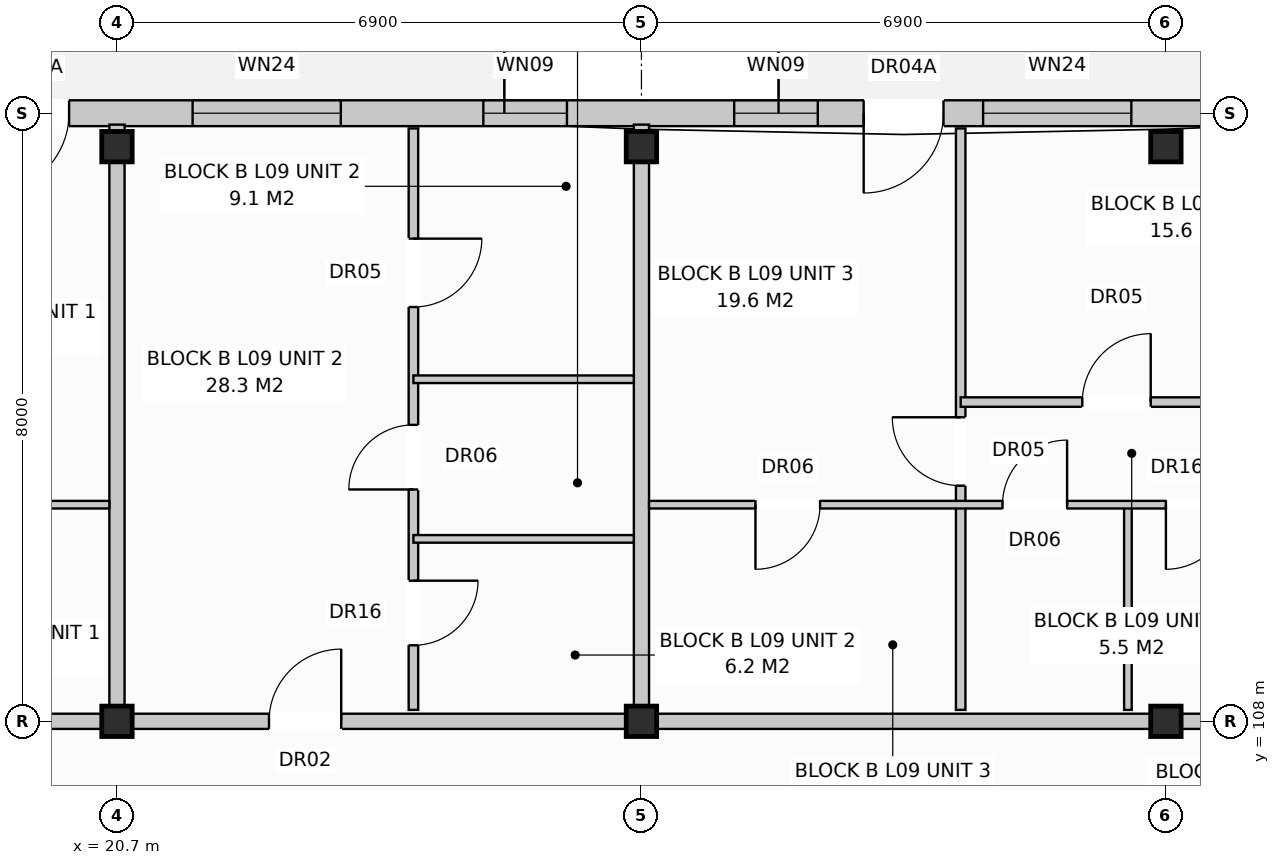
"""IFC4 building model, lengths in metres.
Left out: names, types, materials, properties, quantities, classifications, styles, units other than length and angle.
Written with IfcOpenShell. Run it as: python <this file> out.ifc"""

import sys

from ifc_helpers import new_model, si_unit, direction, frame, frame_2d, origin, origin_with_axes, origin_2d, place, context, subcontext, project, spatial, rectangle, extrude, element, fill, save


model = new_model("IFC4")
c1 = context("Model", 3, precision=1e-05, world=origin(), true_north=direction((0.0, 1.0)))
c2 = subcontext(c1, "Body", "Model", "MODEL_VIEW")
j1 = project(units=[si_unit("LENGTHUNIT", "METRE"), si_unit("PLANEANGLEUNIT", "RADIAN")], contexts=[c1])
p1 = place(None, origin())
s1 = spatial("IfcSite", under=j1, at=p1, CompositionType="ELEMENT")
p2 = place(p1, origin())
s2 = spatial("IfcBuilding", under=s1, at=p2, CompositionType="ELEMENT")
p3 = place(p2, frame((0.0, 0.0, 30.4)))
s3 = spatial("IfcBuildingStorey", under=s2, at=p3, CompositionType="ELEMENT", Elevation=30.4)
for number, where, z_axis, x_axis in (
    (1, (20.7, 108.0, 0.0), (0.0, 0.0, 1.0), (1.0, 0.0, 0.0)),
    (2, (20.7, 115.56, 0.0), (0.0, 0.0, 1.0), (1.0, 0.0, 0.0)),
    (3, (27.6, 108.0, 0.0), (0.0, 0.0, 1.0), (1.0, 0.0, 0.0)),
    (4, (27.6, 115.56, 0.0), (0.0, 0.0, 1.0), (1.0, 0.0, 0.0)),
    (5, (34.5, 108.0, 0.0), (0.0, 0.0, 1.0), (1.0, 0.0, 0.0)),
    (6, (34.5, 115.56, 0.0), (0.0, 0.0, 1.0), (1.0, 0.0, 0.0)),
):
    element("IfcColumn", number, at=place(p3, frame(where, z_axis=z_axis, x_axis=x_axis)), inside=s3, PredefinedType="COLUMN", context=c2, shape_type="SweptSolid", body=[
        extrude(rectangle(XDim=0.4, YDim=0.4, at=origin_2d()), origin(), (0.0, 0.0, 1.0), 3.2),
    ])
p4 = place(p3, frame((0.16, 116.0, 0.0), z_axis=(0.0, 0.0, 1.0), x_axis=(1.0, 0.0, 0.0)))
e7 = element("IfcWall", 7, at=p4, inside=s3, PredefinedType="STANDARD", context=c2, shape_type="SweptSolid", body=[
    extrude(rectangle(XDim=41.08, YDim=0.34, at=frame_2d((20.54, 0.0))), origin(), (0.0, 0.0, 1.0), 2.96),
])
p5 = place(p4, frame((4.864, 0.0, 0.0)))
e8 = element("IfcOpeningElement", 8, at=p5, cuts=e7, PredefinedType="OPENING", context=c2, shape_type="SweptSolid", body=[
    extrude(rectangle(XDim=1.05, YDim=2.12, at=frame_2d((0.525, 1.06))), frame((0.0, 0.182, 0.0), z_axis=(0.0, -1.0, 0.0), x_axis=(1.0, 0.0, 0.0)), (0.0, 0.0, 1.0), 0.364),
])
p6 = place(p4, frame((18.86, 0.0, 0.0)))
e9 = element("IfcOpeningElement", 9, at=p6, cuts=e7, PredefinedType="OPENING", context=c2, shape_type="SweptSolid", body=[
    extrude(rectangle(XDim=1.05, YDim=2.12, at=frame_2d((0.525, 1.06))), frame((0.0, 0.182, 0.0), z_axis=(0.0, -1.0, 0.0), x_axis=(1.0, 0.0, 0.0)), (0.0, 0.0, 1.0), 0.364),
])
p7 = place(p4, frame((30.364, 0.0, 0.0)))
e10 = element("IfcOpeningElement", 10, at=p7, cuts=e7, PredefinedType="OPENING", context=c2, shape_type="SweptSolid", body=[
    extrude(rectangle(XDim=1.05, YDim=2.12, at=frame_2d((0.525, 1.06))), frame((0.0, 0.182, 0.0), z_axis=(0.0, -1.0, 0.0), x_axis=(1.0, 0.0, 0.0)), (0.0, 0.0, 1.0), 0.364),
])
p8 = place(p4, frame((2.46, 0.0, 0.72)))
e11 = element("IfcOpeningElement", 11, at=p8, cuts=e7, PredefinedType="OPENING", context=c2, shape_type="SweptSolid", body=[
    extrude(rectangle(XDim=1.1, YDim=1.5, at=frame_2d((0.55, 0.75))), frame((0.0, 0.182, 0.0), z_axis=(0.0, -1.0, 0.0), x_axis=(1.0, 0.0, 0.0)), (0.0, 0.0, 1.0), 0.364),
])
p9 = place(p4, frame((7.735, 0.0, 0.8)))
e12 = element("IfcOpeningElement", 12, at=p9, cuts=e7, PredefinedType="OPENING", context=c2, shape_type="SweptSolid", body=[
    extrude(rectangle(XDim=1.95, YDim=1.65, at=frame_2d((0.975, 0.825))), frame((0.0, 0.182, 0.0), z_axis=(0.0, -1.0, 0.0), x_axis=(1.0, 0.0, 0.0)), (0.0, 0.0, 1.0), 0.364),
])
p10 = place(p4, frame((14.56, 0.0, 0.72)))
e13 = element("IfcOpeningElement", 13, at=p10, cuts=e7, PredefinedType="OPENING", context=c2, shape_type="SweptSolid", body=[
    extrude(rectangle(XDim=1.1, YDim=1.5, at=frame_2d((0.55, 0.75))), frame((0.0, 0.182, 0.0), z_axis=(0.0, -1.0, 0.0), x_axis=(1.0, 0.0, 0.0)), (0.0, 0.0, 1.0), 0.364),
])
p11 = place(p4, frame((16.81, 0.0, 0.8)))
e14 = element("IfcOpeningElement", 14, at=p11, cuts=e7, PredefinedType="OPENING", context=c2, shape_type="SweptSolid", body=[
    extrude(rectangle(XDim=1.8, YDim=1.7, at=frame_2d((0.9, 0.85))), frame((0.0, 0.182, 0.0), z_axis=(0.0, -1.0, 0.0), x_axis=(1.0, 0.0, 0.0)), (0.0, 0.0, 1.0), 0.364),
])
p12 = place(p4, frame((21.535, 0.0, 0.8)))
e15 = element("IfcOpeningElement", 15, at=p12, cuts=e7, PredefinedType="OPENING", context=c2, shape_type="SweptSolid", body=[
    extrude(rectangle(XDim=1.95, YDim=1.65, at=frame_2d((0.975, 0.825))), frame((0.0, 0.182, 0.0), z_axis=(0.0, -1.0, 0.0), x_axis=(1.0, 0.0, 0.0)), (0.0, 0.0, 1.0), 0.364),
])
p13 = place(p4, frame((25.36, 0.0, 0.72)))
e16 = element("IfcOpeningElement", 16, at=p13, cuts=e7, PredefinedType="OPENING", context=c2, shape_type="SweptSolid", body=[
    extrude(rectangle(XDim=1.1, YDim=1.5, at=frame_2d((0.55, 0.75))), frame((0.0, 0.182, 0.0), z_axis=(0.0, -1.0, 0.0), x_axis=(1.0, 0.0, 0.0)), (0.0, 0.0, 1.0), 0.364),
])
p14 = place(p4, frame((28.66, 0.0, 0.72)))
e17 = element("IfcOpeningElement", 17, at=p14, cuts=e7, PredefinedType="OPENING", context=c2, shape_type="SweptSolid", body=[
    extrude(rectangle(XDim=1.1, YDim=1.5, at=frame_2d((0.55, 0.75))), frame((0.0, 0.182, 0.0), z_axis=(0.0, -1.0, 0.0), x_axis=(1.0, 0.0, 0.0)), (0.0, 0.0, 1.0), 0.364),
])
p15 = place(p4, frame((31.935, 0.0, 0.8)))
e18 = element("IfcOpeningElement", 18, at=p15, cuts=e7, PredefinedType="OPENING", context=c2, shape_type="SweptSolid", body=[
    extrude(rectangle(XDim=1.95, YDim=1.65, at=frame_2d((0.975, 0.825))), frame((0.0, 0.182, 0.0), z_axis=(0.0, -1.0, 0.0), x_axis=(1.0, 0.0, 0.0)), (0.0, 0.0, 1.0), 0.364),
])
p16 = place(p4, frame((38.06, 0.0, 0.72)))
e19 = element("IfcOpeningElement", 19, at=p16, cuts=e7, PredefinedType="OPENING", context=c2, shape_type="SweptSolid", body=[
    extrude(rectangle(XDim=1.1, YDim=1.5, at=frame_2d((0.55, 0.75))), frame((0.0, 0.182, 0.0), z_axis=(0.0, -1.0, 0.0), x_axis=(1.0, 0.0, 0.0)), (0.0, 0.0, 1.0), 0.364),
])
p17 = place(p3, frame((20.7, 108.15, 0.0), z_axis=(0.0, 0.0, 1.0), x_axis=(0.0, 1.0, 0.0)))
e20 = element("IfcWall", 20, at=p17, inside=s3, PredefinedType="PARTITIONING", context=c2, shape_type="SweptSolid", body=[
    extrude(rectangle(XDim=7.7, YDim=0.2, at=frame_2d((3.85, 0.0))), origin(), (0.0, 0.0, 1.0), 2.96),
])
p18 = place(p3, frame((0.0, 108.0, 0.0), z_axis=(0.0, 0.0, 1.0), x_axis=(1.0, 0.0, 0.0)))
e21 = element("IfcWall", 21, at=p18, inside=s3, PredefinedType="PARTITIONING", context=c2, shape_type="SweptSolid", body=[
    extrude(rectangle(XDim=20.7, YDim=0.2, at=frame_2d((10.35, 0.0))), origin(), (0.0, 0.0, 1.0), 2.4),
])
p19 = place(p18, frame((2.4, 0.0, 0.0)))
e22 = element("IfcOpeningElement", 22, at=p19, cuts=e21, PredefinedType="OPENING", context=c2, shape_type="SweptSolid", body=[
    extrude(rectangle(XDim=0.95, YDim=2.15, at=frame_2d((0.475, 1.075))), frame((0.0, 0.112, 0.0), z_axis=(0.0, -1.0, 0.0), x_axis=(1.0, 0.0, 0.0)), (0.0, 0.0, 1.0), 0.224),
])
p20 = place(p3, frame((6.3, 110.85, 0.0), z_axis=(0.0, 0.0, 1.0), x_axis=(1.0, 0.0, 0.0)))
e23 = element("IfcWall", 23, at=p20, inside=s3, PredefinedType="PARTITIONING", context=c2, shape_type="SweptSolid", body=[
    extrude(rectangle(XDim=14.3, YDim=0.1, at=frame_2d((7.15, 0.0))), origin(), (0.0, 0.0, 1.0), 2.96),
])
p21 = place(p20, frame((1.6, 0.0, 0.0)))
e24 = element("IfcOpeningElement", 24, at=p21, cuts=e23, PredefinedType="OPENING", context=c2, shape_type="SweptSolid", body=[
    extrude(rectangle(XDim=0.9, YDim=2.1, at=frame_2d((0.45, 1.05))), frame((0.0, 0.062, 0.0), z_axis=(0.0, -1.0, 0.0), x_axis=(1.0, 0.0, 0.0)), (0.0, 0.0, 1.0), 0.124),
])
p22 = place(p20, frame((5.1, 0.0, 0.0)))
e25 = element("IfcOpeningElement", 25, at=p22, cuts=e23, PredefinedType="OPENING", context=c2, shape_type="SweptSolid", body=[
    extrude(rectangle(XDim=0.85, YDim=2.05, at=frame_2d((0.425, 1.025))), frame((0.0, 0.062, 0.0), z_axis=(0.0, -1.0, 0.0), x_axis=(1.0, 0.0, 0.0)), (0.0, 0.0, 1.0), 0.124),
])
p23 = place(p20, frame((8.2, 0.0, 0.0)))
e26 = element("IfcOpeningElement", 26, at=p23, cuts=e23, PredefinedType="OPENING", context=c2, shape_type="SweptSolid", body=[
    extrude(rectangle(XDim=0.85, YDim=2.05, at=frame_2d((0.425, 1.025))), frame((0.0, 0.062, 0.0), z_axis=(0.0, -1.0, 0.0), x_axis=(1.0, 0.0, 0.0)), (0.0, 0.0, 1.0), 0.124),
])
p24 = place(p20, frame((11.6, 0.0, 0.0)))
e27 = element("IfcOpeningElement", 27, at=p24, cuts=e23, PredefinedType="OPENING", context=c2, shape_type="SweptSolid", body=[
    extrude(rectangle(XDim=0.85, YDim=2.05, at=frame_2d((0.425, 1.025))), frame((0.0, 0.062, 0.0), z_axis=(0.0, -1.0, 0.0), x_axis=(1.0, 0.0, 0.0)), (0.0, 0.0, 1.0), 0.124),
])
p25 = place(p3, frame((27.6, 108.15, 0.0), z_axis=(0.0, 0.0, 1.0), x_axis=(0.0, 1.0, 0.0)))
e28 = element("IfcWall", 28, at=p25, inside=s3, PredefinedType="PARTITIONING", context=c2, shape_type="SweptSolid", body=[
    extrude(rectangle(XDim=7.7, YDim=0.2, at=frame_2d((3.85, 0.0))), origin(), (0.0, 0.0, 1.0), 2.96),
])
p26 = place(p3, frame((20.7, 108.0, 0.0), z_axis=(0.0, 0.0, 1.0), x_axis=(1.0, 0.0, 0.0)))
e29 = element("IfcWall", 29, at=p26, inside=s3, PredefinedType="PARTITIONING", context=c2, shape_type="SweptSolid", body=[
    extrude(rectangle(XDim=6.9, YDim=0.2, at=frame_2d((3.45, 0.0))), origin(), (0.0, 0.0, 1.0), 2.4),
])
p27 = place(p26, frame((2.0, 0.0, 0.0)))
e30 = element("IfcOpeningElement", 30, at=p27, cuts=e29, PredefinedType="OPENING", context=c2, shape_type="SweptSolid", body=[
    extrude(rectangle(XDim=0.95, YDim=2.15, at=frame_2d((0.475, 1.075))), frame((0.0, 0.112, 0.0), z_axis=(0.0, -1.0, 0.0), x_axis=(1.0, 0.0, 0.0)), (0.0, 0.0, 1.0), 0.224),
])
p28 = place(p3, frame((24.6, 108.15, 0.0), z_axis=(0.0, 0.0, 1.0), x_axis=(0.0, 1.0, 0.0)))
e31 = element("IfcWall", 31, at=p28, inside=s3, PredefinedType="PARTITIONING", context=c2, shape_type="SweptSolid", body=[
    extrude(rectangle(XDim=7.65, YDim=0.125, at=frame_2d((3.825, 0.0))), origin(), (0.0, 0.0, 1.0), 2.96),
])
p29 = place(p28, frame((0.85, 0.0, 0.0)))
e32 = element("IfcOpeningElement", 32, at=p29, cuts=e31, PredefinedType="OPENING", context=c2, shape_type="SweptSolid", body=[
    extrude(rectangle(XDim=0.85, YDim=2.1, at=frame_2d((0.425, 1.05))), frame((0.0, 0.074, 0.0), z_axis=(0.0, -1.0, 0.0), x_axis=(1.0, 0.0, 0.0)), (0.0, 0.0, 1.0), 0.149),
])
p30 = place(p28, frame((2.9, 0.0, 0.0)))
e33 = element("IfcOpeningElement", 33, at=p30, cuts=e31, PredefinedType="OPENING", context=c2, shape_type="SweptSolid", body=[
    extrude(rectangle(XDim=0.85, YDim=2.05, at=frame_2d((0.425, 1.025))), frame((0.0, 0.074, 0.0), z_axis=(0.0, -1.0, 0.0), x_axis=(1.0, 0.0, 0.0)), (0.0, 0.0, 1.0), 0.149),
])
p31 = place(p28, frame((5.3, 0.0, 0.0)))
e34 = element("IfcOpeningElement", 34, at=p31, cuts=e31, PredefinedType="OPENING", context=c2, shape_type="SweptSolid", body=[
    extrude(rectangle(XDim=0.9, YDim=2.1, at=frame_2d((0.45, 1.05))), frame((0.0, 0.074, 0.0), z_axis=(0.0, -1.0, 0.0), x_axis=(1.0, 0.0, 0.0)), (0.0, 0.0, 1.0), 0.149),
])
for number, where, z_axis, x_axis in (
    (35, (24.6, 110.4, 0.0), (0.0, 0.0, 1.0), (1.0, 0.0, 0.0)),
    (36, (24.6, 112.5, 0.0), (0.0, 0.0, 1.0), (1.0, 0.0, 0.0)),
):
    element("IfcWall", number, at=place(p3, frame(where, z_axis=z_axis, x_axis=x_axis)), inside=s3, PredefinedType="PARTITIONING", context=c2, shape_type="SweptSolid", body=[
        extrude(rectangle(XDim=2.9, YDim=0.1, at=frame_2d((1.45, 0.0))), origin(), (0.0, 0.0, 1.0), 2.96),
    ])
p32 = place(p3, frame((27.6, 108.0, 0.0), z_axis=(0.0, 0.0, 1.0), x_axis=(1.0, 0.0, 0.0)))
e37 = element("IfcWall", 37, at=p32, inside=s3, PredefinedType="PARTITIONING", context=c2, shape_type="SweptSolid", body=[
    extrude(rectangle(XDim=13.8, YDim=0.2, at=frame_2d((6.9, 0.0))), origin(), (0.0, 0.0, 1.0), 2.4),
])
p33 = place(p32, frame((9.6, 0.0, 0.0)))
e38 = element("IfcOpeningElement", 38, at=p33, cuts=e37, PredefinedType="OPENING", context=c2, shape_type="SweptSolid", body=[
    extrude(rectangle(XDim=0.95, YDim=2.15, at=frame_2d((0.475, 1.075))), frame((0.0, 0.112, 0.0), z_axis=(0.0, -1.0, 0.0), x_axis=(1.0, 0.0, 0.0)), (0.0, 0.0, 1.0), 0.224),
])
p34 = place(p3, frame((31.8, 108.15, 0.0), z_axis=(0.0, 0.0, 1.0), x_axis=(0.0, 1.0, 0.0)))
e39 = element("IfcWall", 39, at=p34, inside=s3, PredefinedType="PARTITIONING", context=c2, shape_type="SweptSolid", body=[
    extrude(rectangle(XDim=7.65, YDim=0.125, at=frame_2d((3.825, 0.0))), origin(), (0.0, 0.0, 1.0), 2.96),
])
p35 = place(p34, frame((2.95, 0.0, 0.0)))
e40 = element("IfcOpeningElement", 40, at=p35, cuts=e39, PredefinedType="OPENING", context=c2, shape_type="SweptSolid", body=[
    extrude(rectangle(XDim=0.9, YDim=2.1, at=frame_2d((0.45, 1.05))), frame((0.0, 0.074, 0.0), z_axis=(0.0, -1.0, 0.0), x_axis=(1.0, 0.0, 0.0)), (0.0, 0.0, 1.0), 0.149),
])
p36 = place(p3, frame((34.0, 108.15, 0.0), z_axis=(0.0, 0.0, 1.0), x_axis=(0.0, 1.0, 0.0)))
e41 = element("IfcWall", 41, at=p36, inside=s3, PredefinedType="PARTITIONING", context=c2, shape_type="SweptSolid", body=[
    extrude(rectangle(XDim=2.7, YDim=0.1, at=frame_2d((1.35, 0.0))), origin(), (0.0, 0.0, 1.0), 2.96),
])
p37 = place(p3, frame((27.7, 110.85, 0.0), z_axis=(0.0, 0.0, 1.0), x_axis=(1.0, 0.0, 0.0)))
e42 = element("IfcWall", 42, at=p37, inside=s3, PredefinedType="PARTITIONING", context=c2, shape_type="SweptSolid", body=[
    extrude(rectangle(XDim=8.6, YDim=0.1, at=frame_2d((4.3, 0.0))), origin(), (0.0, 0.0, 1.0), 2.96),
])
p38 = place(p37, frame((1.4, 0.0, 0.0)))
e43 = element("IfcOpeningElement", 43, at=p38, cuts=e42, PredefinedType="OPENING", context=c2, shape_type="SweptSolid", body=[
    extrude(rectangle(XDim=0.85, YDim=2.05, at=frame_2d((0.425, 1.025))), frame((0.0, 0.062, 0.0), z_axis=(0.0, -1.0, 0.0), x_axis=(1.0, 0.0, 0.0)), (0.0, 0.0, 1.0), 0.124),
])
p39 = place(p37, frame((4.65, 0.0, 0.0)))
e44 = element("IfcOpeningElement", 44, at=p39, cuts=e42, PredefinedType="OPENING", context=c2, shape_type="SweptSolid", body=[
    extrude(rectangle(XDim=0.85, YDim=2.05, at=frame_2d((0.425, 1.025))), frame((0.0, 0.062, 0.0), z_axis=(0.0, -1.0, 0.0), x_axis=(1.0, 0.0, 0.0)), (0.0, 0.0, 1.0), 0.124),
])
p40 = place(p37, frame((6.8, 0.0, 0.0)))
e45 = element("IfcOpeningElement", 45, at=p40, cuts=e42, PredefinedType="OPENING", context=c2, shape_type="SweptSolid", body=[
    extrude(rectangle(XDim=0.85, YDim=2.1, at=frame_2d((0.425, 1.05))), frame((0.0, 0.062, 0.0), z_axis=(0.0, -1.0, 0.0), x_axis=(1.0, 0.0, 0.0)), (0.0, 0.0, 1.0), 0.124),
])
p41 = place(p3, frame((31.8, 112.2, 0.0), z_axis=(0.0, 0.0, 1.0), x_axis=(1.0, 0.0, 0.0)))
e46 = element("IfcWall", 46, at=p41, inside=s3, PredefinedType="PARTITIONING", context=c2, shape_type="SweptSolid", body=[
    extrude(rectangle(XDim=4.5, YDim=0.125, at=frame_2d((2.25, 0.0))), origin(), (0.0, 0.0, 1.0), 2.96),
])
p42 = place(p41, frame((1.6, 0.0, 0.0)))
e47 = element("IfcOpeningElement", 47, at=p42, cuts=e46, PredefinedType="OPENING", context=c2, shape_type="SweptSolid", body=[
    extrude(rectangle(XDim=0.9, YDim=2.1, at=frame_2d((0.45, 1.05))), frame((0.0, 0.074, 0.0), z_axis=(0.0, -1.0, 0.0), x_axis=(1.0, 0.0, 0.0)), (0.0, 0.0, 1.0), 0.149),
])
p43 = place(p6, frame((1.05, 0.0, 0.0), z_axis=(0.0, 0.0, 1.0), x_axis=(-1.0, 0.0, 0.0)))
e48 = element("IfcDoor", 48, at=p43, inside=s3, OperationType="SINGLE_SWING_LEFT", PredefinedType="DOOR", context=c2, shape_type="SweptSolid", body=[
    extrude(rectangle(XDim=1.05, YDim=2.12, at=frame_2d((0.525, 1.06))), frame((0.0, 0.025, 0.0), z_axis=(0.0, -1.0, 0.0), x_axis=(1.0, 0.0, 0.0)), (0.0, 0.0, 1.0), 0.05),
])
fill(e9, e48)
p44 = place(p7, frame((1.05, 0.0, 0.0), z_axis=(0.0, 0.0, 1.0), x_axis=(-1.0, 0.0, 0.0)))
e49 = element("IfcDoor", 49, at=p44, inside=s3, OperationType="SINGLE_SWING_LEFT", PredefinedType="DOOR", context=c2, shape_type="SweptSolid", body=[
    extrude(rectangle(XDim=1.05, YDim=2.12, at=frame_2d((0.525, 1.06))), frame((0.0, 0.025, 0.0), z_axis=(0.0, -1.0, 0.0), x_axis=(1.0, 0.0, 0.0)), (0.0, 0.0, 1.0), 0.05),
])
fill(e10, e49)
p45 = place(p12, origin_with_axes())
e50 = element("IfcWindow", 50, at=p45, inside=s3, PartitioningType="SINGLE_PANEL", PredefinedType="WINDOW", context=c2, shape_type="SweptSolid", body=[
    extrude(rectangle(XDim=1.95, YDim=1.65, at=frame_2d((0.975, 0.825))), frame((0.0, 0.03, 0.0), z_axis=(0.0, -1.0, 0.0), x_axis=(1.0, 0.0, 0.0)), (0.0, 0.0, 1.0), 0.06),
])
fill(e15, e50)
p46 = place(p13, origin_with_axes())
e51 = element("IfcWindow", 51, at=p46, inside=s3, PartitioningType="SINGLE_PANEL", PredefinedType="WINDOW", context=c2, shape_type="SweptSolid", body=[
    extrude(rectangle(XDim=1.1, YDim=1.5, at=frame_2d((0.55, 0.75))), frame((0.0, 0.03, 0.0), z_axis=(0.0, -1.0, 0.0), x_axis=(1.0, 0.0, 0.0)), (0.0, 0.0, 1.0), 0.06),
])
fill(e16, e51)
p47 = place(p14, origin_with_axes())
e52 = element("IfcWindow", 52, at=p47, inside=s3, PartitioningType="SINGLE_PANEL", PredefinedType="WINDOW", context=c2, shape_type="SweptSolid", body=[
    extrude(rectangle(XDim=1.1, YDim=1.5, at=frame_2d((0.55, 0.75))), frame((0.0, 0.03, 0.0), z_axis=(0.0, -1.0, 0.0), x_axis=(1.0, 0.0, 0.0)), (0.0, 0.0, 1.0), 0.06),
])
fill(e17, e52)
p48 = place(p15, origin_with_axes())
e53 = element("IfcWindow", 53, at=p48, inside=s3, PartitioningType="SINGLE_PANEL", PredefinedType="WINDOW", context=c2, shape_type="SweptSolid", body=[
    extrude(rectangle(XDim=1.95, YDim=1.65, at=frame_2d((0.975, 0.825))), frame((0.0, 0.03, 0.0), z_axis=(0.0, -1.0, 0.0), x_axis=(1.0, 0.0, 0.0)), (0.0, 0.0, 1.0), 0.06),
])
fill(e18, e53)
p49 = place(p27, origin_with_axes())
e54 = element("IfcDoor", 54, at=p49, inside=s3, OperationType="SINGLE_SWING_RIGHT", PredefinedType="DOOR", context=c2, shape_type="SweptSolid", body=[
    extrude(rectangle(XDim=0.95, YDim=2.15, at=frame_2d((0.475, 1.075))), frame((0.0, 0.025, 0.0), z_axis=(0.0, -1.0, 0.0), x_axis=(1.0, 0.0, 0.0)), (0.0, 0.0, 1.0), 0.05),
])
fill(e30, e54)
p50 = place(p29, frame((0.85, 0.0, 0.0), z_axis=(0.0, 0.0, 1.0), x_axis=(-1.0, 0.0, 0.0)))
e55 = element("IfcDoor", 55, at=p50, inside=s3, OperationType="SINGLE_SWING_RIGHT", PredefinedType="DOOR", context=c2, shape_type="SweptSolid", body=[
    extrude(rectangle(XDim=0.85, YDim=2.1, at=frame_2d((0.425, 1.05))), frame((0.0, 0.025, 0.0), z_axis=(0.0, -1.0, 0.0), x_axis=(1.0, 0.0, 0.0)), (0.0, 0.0, 1.0), 0.05),
])
fill(e32, e55)
p51 = place(p30, origin_with_axes())
e56 = element("IfcDoor", 56, at=p51, inside=s3, OperationType="SINGLE_SWING_LEFT", PredefinedType="DOOR", context=c2, shape_type="SweptSolid", body=[
    extrude(rectangle(XDim=0.85, YDim=2.05, at=frame_2d((0.425, 1.025))), frame((0.0, 0.025, 0.0), z_axis=(0.0, -1.0, 0.0), x_axis=(1.0, 0.0, 0.0)), (0.0, 0.0, 1.0), 0.05),
])
fill(e33, e56)
p52 = place(p31, frame((0.9, 0.0, 0.0), z_axis=(0.0, 0.0, 1.0), x_axis=(-1.0, 0.0, 0.0)))
e57 = element("IfcDoor", 57, at=p52, inside=s3, OperationType="SINGLE_SWING_RIGHT", PredefinedType="DOOR", context=c2, shape_type="SweptSolid", body=[
    extrude(rectangle(XDim=0.9, YDim=2.1, at=frame_2d((0.45, 1.05))), frame((0.0, 0.025, 0.0), z_axis=(0.0, -1.0, 0.0), x_axis=(1.0, 0.0, 0.0)), (0.0, 0.0, 1.0), 0.05),
])
fill(e34, e57)
p53 = place(p35, origin_with_axes())
e58 = element("IfcDoor", 58, at=p53, inside=s3, OperationType="SINGLE_SWING_RIGHT", PredefinedType="DOOR", context=c2, shape_type="SweptSolid", body=[
    extrude(rectangle(XDim=0.9, YDim=2.1, at=frame_2d((0.45, 1.05))), frame((0.0, 0.025, 0.0), z_axis=(0.0, -1.0, 0.0), x_axis=(1.0, 0.0, 0.0)), (0.0, 0.0, 1.0), 0.05),
])
fill(e40, e58)
p54 = place(p38, frame((0.85, 0.0, 0.0), z_axis=(0.0, 0.0, 1.0), x_axis=(-1.0, 0.0, 0.0)))
e59 = element("IfcDoor", 59, at=p54, inside=s3, OperationType="SINGLE_SWING_LEFT", PredefinedType="DOOR", context=c2, shape_type="SweptSolid", body=[
    extrude(rectangle(XDim=0.85, YDim=2.05, at=frame_2d((0.425, 1.025))), frame((0.0, 0.025, 0.0), z_axis=(0.0, -1.0, 0.0), x_axis=(1.0, 0.0, 0.0)), (0.0, 0.0, 1.0), 0.05),
])
fill(e43, e59)
p55 = place(p39, origin_with_axes())
e60 = element("IfcDoor", 60, at=p55, inside=s3, OperationType="SINGLE_SWING_RIGHT", PredefinedType="DOOR", context=c2, shape_type="SweptSolid", body=[
    extrude(rectangle(XDim=0.85, YDim=2.05, at=frame_2d((0.425, 1.025))), frame((0.0, 0.025, 0.0), z_axis=(0.0, -1.0, 0.0), x_axis=(1.0, 0.0, 0.0)), (0.0, 0.0, 1.0), 0.05),
])
fill(e44, e60)
p56 = place(p40, frame((0.85, 0.0, 0.0), z_axis=(0.0, 0.0, 1.0), x_axis=(-1.0, 0.0, 0.0)))
e61 = element("IfcDoor", 61, at=p56, inside=s3, OperationType="SINGLE_SWING_LEFT", PredefinedType="DOOR", context=c2, shape_type="SweptSolid", body=[
    extrude(rectangle(XDim=0.85, YDim=2.1, at=frame_2d((0.425, 1.05))), frame((0.0, 0.025, 0.0), z_axis=(0.0, -1.0, 0.0), x_axis=(1.0, 0.0, 0.0)), (0.0, 0.0, 1.0), 0.05),
])
fill(e45, e61)
p57 = place(p42, origin_with_axes())
e62 = element("IfcDoor", 62, at=p57, inside=s3, OperationType="SINGLE_SWING_RIGHT", PredefinedType="DOOR", context=c2, shape_type="SweptSolid", body=[
    extrude(rectangle(XDim=0.9, YDim=2.1, at=frame_2d((0.45, 1.05))), frame((0.0, 0.025, 0.0), z_axis=(0.0, -1.0, 0.0), x_axis=(1.0, 0.0, 0.0)), (0.0, 0.0, 1.0), 0.05),
])
fill(e47, e62)
save(model, sys.argv[1])
